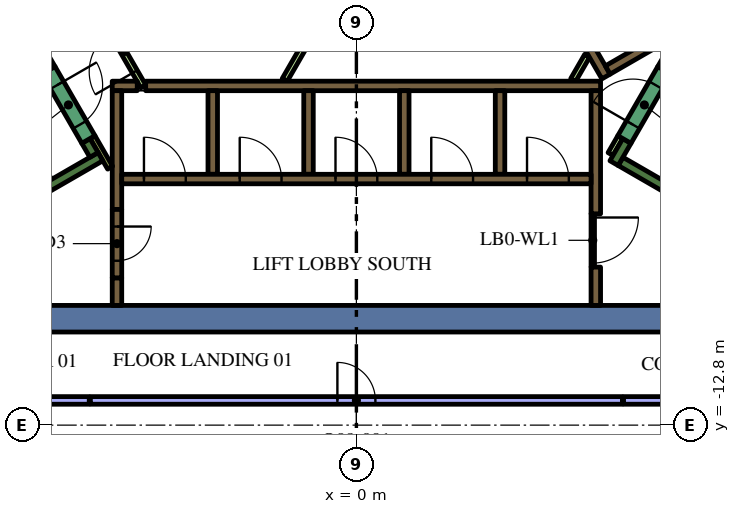
"""IFC4 building model, lengths in metres.
Left out: names, types, materials, properties, quantities, classifications, styles, units other than length and angle.
Written with IfcOpenShell. Run it as: python <this file> out.ifc"""

import sys

from ifc_helpers import new_model, si_unit, direction, frame, frame_2d, origin, place, context, subcontext, project, spatial, rectangle, extrude, element, fill, save


model = new_model("IFC4")
c1 = context("Model", 3, precision=1e-05, world=origin(), true_north=direction((0.0, 1.0)))
c2 = subcontext(c1, "Body", "Model", "MODEL_VIEW")
j1 = project(units=[si_unit("LENGTHUNIT", "METRE"), si_unit("PLANEANGLEUNIT", "RADIAN")], contexts=[c1])
p1 = place(None, origin())
s1 = spatial("IfcSite", under=j1, at=p1, CompositionType="ELEMENT")
p2 = place(p1, origin())
s2 = spatial("IfcBuilding", under=s1, at=p2, CompositionType="ELEMENT")
p3 = place(p2, frame((0.0, 0.0, 239.4)))
s3 = spatial("IfcBuildingStorey", under=s2, at=p3, CompositionType="ELEMENT", Elevation=239.4)
p4 = place(p3, frame((8.904, -10.0, 0.0), z_axis=(0.0, 0.0, 1.0), x_axis=(-1.0, 0.0, 0.0)))
e1 = element("IfcWall", 1, at=p4, inside=s3, PredefinedType="SOLIDWALL", context=c2, shape_type="SweptSolid", body=[
    extrude(rectangle(XDim=22.226, YDim=0.7, at=frame_2d((11.113, 0.0))), origin(), (0.0, 0.0, 1.0), 4.2),
])
p5 = place(p3, frame((12.84, -9.261, 0.0), z_axis=(0.0, 0.0, 1.0), x_axis=(-0.866013990052, 0.500019768644, 0.0)))
e2 = element("IfcWall", 2, at=p5, inside=s3, PredefinedType="SOLIDWALL", context=c2, shape_type="SweptSolid", body=[
    extrude(rectangle(XDim=6.8, YDim=0.25, at=frame_2d((3.4, 0.0))), origin(), (0.0, 0.0, 1.0), 4.2),
])
p6 = place(p3, frame((6.78, -5.906, 0.0), z_axis=(0.0, 0.0, 1.0), x_axis=(0.500223362819, 0.865896406789, 0.0)))
e3 = element("IfcWall", 3, at=p6, inside=s3, PredefinedType="SOLIDWALL", context=c2, shape_type="SweptSolid", body=[
    extrude(rectangle(XDim=0.675, YDim=0.25, at=frame_2d((0.337, 0.0))), origin(), (0.0, 0.0, 1.0), 4.2),
])
p7 = place(p3, frame((-12.84, -9.261, 0.0), z_axis=(0.0, 0.0, 1.0), x_axis=(0.866016039709, 0.500016218704, 0.0)))
e4 = element("IfcWall", 4, at=p7, inside=s3, PredefinedType="SOLIDWALL", context=c2, shape_type="SweptSolid", body=[
    extrude(rectangle(XDim=7.05, YDim=0.25, at=frame_2d((3.525, 0.0))), origin(), (0.0, 0.0, 1.0), 4.2),
])
p8 = place(p3, frame((-6.905, -5.69, 0.0), z_axis=(0.0, 0.0, 1.0), x_axis=(-0.500402024738, 0.865793170242, 0.0)))
e5 = element("IfcWall", 5, at=p8, inside=s3, PredefinedType="SOLIDWALL", context=c2, shape_type="SweptSolid", body=[
    extrude(rectangle(XDim=0.425, YDim=0.25, at=frame_2d((0.212, 0.0))), origin(), (0.0, 0.0, 1.0), 4.2),
])
p9 = place(p3, frame((-6.3, -8.925, 0.0), z_axis=(0.0, 0.0, 1.0), x_axis=(0.0, -1.0, 0.0)))
e6 = element("IfcWall", 6, at=p9, inside=s3, PredefinedType="SOLIDWALL", context=c2, shape_type="SweptSolid", body=[
    extrude(rectangle(XDim=0.725, YDim=0.25, at=frame_2d((0.363, 0.0))), origin(), (0.0, 0.0, 1.0), 4.2),
])
p10 = place(p3, frame((-5.545, -3.875, 0.0), z_axis=(0.0, 0.0, 1.0), x_axis=(1.0, 0.0, 0.0)))
e7 = element("IfcWall", 7, at=p10, inside=s3, PredefinedType="SOLIDWALL", context=c2, shape_type="SweptSolid", body=[
    extrude(rectangle(XDim=11.97, YDim=0.25, at=frame_2d((5.985, 0.0))), origin(), (0.0, 0.0, 1.0), 4.2),
])
p11 = place(p3, frame((-6.425, -3.875, 0.0), z_axis=(0.0, 0.0, 1.0), x_axis=(1.0, 0.0, 0.0)))
e8 = element("IfcWall", 8, at=p11, inside=s3, PredefinedType="SOLIDWALL", context=c2, shape_type="SweptSolid", body=[
    extrude(rectangle(XDim=0.658, YDim=0.25, at=frame_2d((0.329, 0.0))), origin(), (0.0, 0.0, 1.0), 4.2),
])
p12 = place(p3, frame((6.3, -7.24, 0.0), z_axis=(0.0, 0.0, 1.0), x_axis=(0.0, 1.0, 0.0)))
e9 = element("IfcWall", 9, at=p12, inside=s3, PredefinedType="SOLIDWALL", context=c2, shape_type="SweptSolid", body=[
    extrude(rectangle(XDim=3.24, YDim=0.25, at=frame_2d((1.62, 0.0))), origin(), (0.0, 0.0, 1.0), 4.2),
])
p13 = place(p3, frame((6.3, -9.65, 0.0), z_axis=(0.0, 0.0, 1.0), x_axis=(0.0, 1.0, 0.0)))
e10 = element("IfcWall", 10, at=p13, inside=s3, PredefinedType="SOLIDWALL", context=c2, shape_type="SweptSolid", body=[
    extrude(rectangle(XDim=1.008, YDim=0.25, at=frame_2d((0.504, 0.0))), origin(), (0.0, 0.0, 1.0), 4.2),
])
for number, where, z_axis, x_axis in (
    (11, (3.78, -4.0, 0.0), (0.0, 0.0, 1.0), (0.0, -1.0, 0.0)),
    (12, (1.26, -4.0, 0.0), (0.0, 0.0, 1.0), (0.0, -1.0, 0.0)),
    (13, (-1.26, -4.0, 0.0), (0.0, 0.0, 1.0), (0.0, -1.0, 0.0)),
    (14, (-3.78, -4.0, 0.0), (0.0, 0.0, 1.0), (0.0, -1.0, 0.0)),
):
    element("IfcWall", number, at=place(p3, frame(where, z_axis=z_axis, x_axis=x_axis)), inside=s3, PredefinedType="SOLIDWALL", context=c2, shape_type="SweptSolid", body=[
        extrude(rectangle(XDim=2.2, YDim=0.25, at=frame_2d((1.1, 0.0))), origin(), (0.0, 0.0, 1.0), 4.2),
    ])
p14 = place(p3, frame((-6.3, -7.125, 0.0), z_axis=(0.0, 0.0, 1.0), x_axis=(0.0, 1.0, 0.0)))
e15 = element("IfcWall", 15, at=p14, inside=s3, PredefinedType="SOLIDWALL", context=c2, shape_type="SweptSolid", body=[
    extrude(rectangle(XDim=3.125, YDim=0.25, at=frame_2d((1.562, 0.0))), origin(), (0.0, 0.0, 1.0), 4.2),
])
p15 = place(p3, frame((6.568, -3.627, 0.0), z_axis=(0.0, 0.0, 1.0), x_axis=(-0.499999455981, 0.866025717874, 0.0)))
e16 = element("IfcWall", 16, at=p15, inside=s3, PredefinedType="SOLIDWALL", context=c2, shape_type="SweptSolid", body=[
    extrude(rectangle(XDim=11.978, YDim=0.25, at=frame_2d((5.989, 0.0))), origin(), (0.0, 0.0, 1.0), 4.2),
])
p16 = place(p3, frame((6.614, -3.456, 0.0), z_axis=(0.0, 0.0, 1.0), x_axis=(0.866032512851, 0.499987686533, 0.0)))
e17 = element("IfcWall", 17, at=p16, inside=s3, PredefinedType="SOLIDWALL", context=c2, shape_type="SweptSolid", body=[
    extrude(rectangle(XDim=2.975, YDim=0.25, at=frame_2d((1.487, 0.0))), origin(), (0.0, 0.0, 1.0), 4.2),
])
p17 = place(p3, frame((-8.252, -2.958, 0.0), z_axis=(0.0, 0.0, 1.0), x_axis=(0.500174715838, -0.865924508047, 0.0)))
e18 = element("IfcWall", 18, at=p17, inside=s3, PredefinedType="PARTITIONING", context=c2, shape_type="SweptSolid", body=[
    extrude(rectangle(XDim=0.514, YDim=0.15, at=frame_2d((0.257, 0.0))), origin(), (0.0, 0.0, 1.0), 3.45),
])
p18 = place(p3, frame((-6.48, -6.027, 0.0), z_axis=(0.0, 0.0, 1.0), x_axis=(-0.499927229454, 0.866067413802, 0.0)))
e19 = element("IfcWall", 19, at=p18, inside=s3, PredefinedType="PARTITIONING", context=c2, shape_type="SweptSolid", body=[
    extrude(rectangle(XDim=0.929, YDim=0.15, at=frame_2d((0.464, 0.0))), origin(), (0.0, 0.0, 1.0), 4.2),
])
p19 = place(p3, frame((6.945, -5.222, 0.0), z_axis=(0.0, 0.0, 1.0), x_axis=(-0.499818422106, -0.866130212453, 0.0)))
e20 = element("IfcWall", 20, at=p19, inside=s3, PredefinedType="PARTITIONING", context=c2, shape_type="SweptSolid", body=[
    extrude(rectangle(XDim=0.514, YDim=0.15, at=frame_2d((0.257, 0.0))), origin(), (0.0, 0.0, 1.0), 3.45),
])
p20 = place(p3, frame((8.459, -2.599, 0.0), z_axis=(0.0, 0.0, 1.0), x_axis=(-0.500041054325, -0.866001699761, 0.0)))
e21 = element("IfcWall", 21, at=p20, inside=s3, PredefinedType="PARTITIONING", context=c2, shape_type="SweptSolid", body=[
    extrude(rectangle(XDim=0.929, YDim=0.15, at=frame_2d((0.464, 0.0))), origin(), (0.0, 0.0, 1.0), 4.2),
])
p21 = place(p3, frame((5.705, -3.718, 0.0), z_axis=(0.0, 0.0, 1.0), x_axis=(0.499962090823, 0.866047289552, 0.0)))
e22 = element("IfcWall", 22, at=p21, inside=s3, PredefinedType="PARTITIONING", context=c2, shape_type="SweptSolid", body=[
    extrude(rectangle(XDim=0.735, YDim=0.15, at=frame_2d((0.367, 0.0))), origin(), (0.0, 0.0, 1.0), 3.45),
])
p22 = place(p3, frame((-1.887, -3.718, 0.0), z_axis=(0.0, 0.0, 1.0), x_axis=(0.500043732237, 0.866000153493, 0.0)))
e23 = element("IfcWall", 23, at=p22, inside=s3, PredefinedType="PARTITIONING", context=c2, shape_type="SweptSolid", body=[
    extrude(rectangle(XDim=3.114, YDim=0.15, at=frame_2d((1.557, 0.0))), origin(), (0.0, 0.0, 1.0), 3.45),
])
p23 = place(p3, frame((-6.175, -6.325, 0.0), z_axis=(0.0, 0.0, 1.0), x_axis=(1.0, 0.0, 0.0)))
e24 = element("IfcWall", 24, at=p23, inside=s3, PredefinedType="SOLIDWALL", context=c2, shape_type="SweptSolid", body=[
    extrude(rectangle(XDim=12.35, YDim=0.25, at=frame_2d((6.175, 0.0))), origin(), (0.0, 0.0, 1.0), 4.2),
])
p24 = place(p23, frame((0.585, 0.0, 0.0)))
e25 = element("IfcOpeningElement", 25, at=p24, cuts=e24, PredefinedType="OPENING", context=c2, shape_type="SweptSolid", body=[
    extrude(rectangle(XDim=1.1, YDim=2.1, at=frame_2d((0.55, 1.05))), frame((0.0, 0.135, 0.0), z_axis=(0.0, -1.0, 0.0), x_axis=(1.0, 0.0, 0.0)), (0.0, 0.0, 1.0), 0.27),
])
p25 = place(p23, frame((3.105, 0.0, 0.0)))
e26 = element("IfcOpeningElement", 26, at=p25, cuts=e24, PredefinedType="OPENING", context=c2, shape_type="SweptSolid", body=[
    extrude(rectangle(XDim=1.1, YDim=2.1, at=frame_2d((0.55, 1.05))), frame((0.0, 0.135, 0.0), z_axis=(0.0, -1.0, 0.0), x_axis=(1.0, 0.0, 0.0)), (0.0, 0.0, 1.0), 0.27),
])
p26 = place(p23, frame((5.625, 0.0, 0.0)))
e27 = element("IfcOpeningElement", 27, at=p26, cuts=e24, PredefinedType="OPENING", context=c2, shape_type="SweptSolid", body=[
    extrude(rectangle(XDim=1.1, YDim=2.1, at=frame_2d((0.55, 1.05))), frame((0.0, 0.135, 0.0), z_axis=(0.0, -1.0, 0.0), x_axis=(1.0, 0.0, 0.0)), (0.0, 0.0, 1.0), 0.27),
])
p27 = place(p23, frame((8.145, 0.0, 0.0)))
e28 = element("IfcOpeningElement", 28, at=p27, cuts=e24, PredefinedType="OPENING", context=c2, shape_type="SweptSolid", body=[
    extrude(rectangle(XDim=1.1, YDim=2.1, at=frame_2d((0.55, 1.05))), frame((0.0, 0.135, 0.0), z_axis=(0.0, -1.0, 0.0), x_axis=(1.0, 0.0, 0.0)), (0.0, 0.0, 1.0), 0.27),
])
p28 = place(p23, frame((10.665, 0.0, 0.0)))
e29 = element("IfcOpeningElement", 29, at=p28, cuts=e24, PredefinedType="OPENING", context=c2, shape_type="SweptSolid", body=[
    extrude(rectangle(XDim=1.1, YDim=2.1, at=frame_2d((0.55, 1.05))), frame((0.0, 0.135, 0.0), z_axis=(0.0, -1.0, 0.0), x_axis=(1.0, 0.0, 0.0)), (0.0, 0.0, 1.0), 0.27),
])
p29 = place(p3, frame((7.053, -5.284, 0.0), z_axis=(0.0, 0.0, 1.0), x_axis=(0.500078061341, 0.865980330357, 0.0)))
e30 = element("IfcWall", 30, at=p29, inside=s3, PredefinedType="SOLIDWALL", context=c2, shape_type="SweptSolid", body=[
    extrude(rectangle(XDim=2.1, YDim=0.4, at=frame_2d((1.05, 0.0))), origin(), (0.0, 0.0, 1.0), 4.2),
])
p30 = place(p29, frame((0.45, 0.0, 0.0)))
e31 = element("IfcOpeningElement", 31, at=p30, cuts=e30, PredefinedType="OPENING", context=c2, shape_type="SweptSolid", body=[
    extrude(rectangle(XDim=1.2, YDim=2.1, at=frame_2d((0.6, 1.05))), frame((0.0, 0.21, 0.0), z_axis=(0.0, -1.0, 0.0), x_axis=(1.0, 0.0, 0.0)), (0.0, 0.0, 1.0), 0.42),
])
p31 = place(p3, frame((-8.103, -3.466, 0.0), z_axis=(0.0, 0.0, 1.0), x_axis=(0.500078061341, -0.865980330357, 0.0)))
e32 = element("IfcWall", 32, at=p31, inside=s3, PredefinedType="SOLIDWALL", context=c2, shape_type="SweptSolid", body=[
    extrude(rectangle(XDim=2.1, YDim=0.4, at=frame_2d((1.05, 0.0))), origin(), (0.0, 0.0, 1.0), 4.2),
])
p32 = place(p31, frame((0.45, 0.0, 0.0)))
e33 = element("IfcOpeningElement", 33, at=p32, cuts=e32, PredefinedType="OPENING", context=c2, shape_type="SweptSolid", body=[
    extrude(rectangle(XDim=1.2, YDim=2.1, at=frame_2d((0.6, 1.05))), frame((0.0, 0.21, 0.0), z_axis=(0.0, -1.0, 0.0), x_axis=(1.0, 0.0, 0.0)), (0.0, 0.0, 1.0), 0.42),
])
p33 = place(p3, frame((-6.3, -7.125, 0.0), z_axis=(0.0, 0.0, 1.0), x_axis=(0.0, -1.0, 0.0)))
e34 = element("IfcWall", 34, at=p33, inside=s3, PredefinedType="SOLIDWALL", context=c2, shape_type="SweptSolid", body=[
    extrude(rectangle(XDim=1.8, YDim=0.25, at=frame_2d((0.9, 0.0))), origin(), (0.0, 0.0, 1.0), 4.2),
])
p34 = place(p33, frame((0.45, 0.0, 0.0)))
e35 = element("IfcOpeningElement", 35, at=p34, cuts=e34, PredefinedType="OPENING", context=c2, shape_type="SweptSolid", body=[
    extrude(rectangle(XDim=0.9, YDim=2.1, at=frame_2d((0.45, 1.05))), frame((0.0, 0.135, 0.0), z_axis=(0.0, -1.0, 0.0), x_axis=(1.0, 0.0, 0.0)), (0.0, 0.0, 1.0), 0.27),
])
p35 = place(p3, frame((-5.606, -3.89, 0.0), z_axis=(0.0, 0.0, 1.0), x_axis=(-0.500027713859, 0.866009402589, 0.0)))
e36 = element("IfcWall", 36, at=p35, inside=s3, PredefinedType="PARTITIONING", context=c2, shape_type="SweptSolid", body=[
    extrude(rectangle(XDim=2.1, YDim=0.15, at=frame_2d((1.05, 0.0))), origin(), (0.0, 0.0, 1.0), 3.45),
])
p36 = place(p35, frame((0.45, 0.0, 0.0)))
e37 = element("IfcOpeningElement", 37, at=p36, cuts=e36, PredefinedType="OPENING", context=c2, shape_type="SweptSolid", body=[
    extrude(rectangle(XDim=1.2, YDim=2.1, at=frame_2d((0.6, 1.05))), frame((0.0, 0.085, 0.0), z_axis=(0.0, -1.0, 0.0), x_axis=(1.0, 0.0, 0.0)), (0.0, 0.0, 1.0), 0.17),
])
p37 = place(p3, frame((6.22, -7.237, 0.0), z_axis=(0.0, 0.0, 1.0), x_axis=(0.0, -1.0, 0.0)))
e38 = element("IfcWall", 38, at=p37, inside=s3, PredefinedType="PARTITIONING", context=c2, shape_type="SweptSolid", body=[
    extrude(rectangle(XDim=1.4, YDim=0.09, at=frame_2d((0.7, 0.0))), origin(), (0.0, 0.0, 1.0), 3.45),
])
p38 = place(p37, frame((0.1, 0.0, 0.0)))
e39 = element("IfcOpeningElement", 39, at=p38, cuts=e38, PredefinedType="OPENING", context=c2, shape_type="SweptSolid", body=[
    extrude(rectangle(XDim=1.2, YDim=2.1, at=frame_2d((0.6, 1.05))), frame((0.0, 0.055, 0.0), z_axis=(0.0, -1.0, 0.0), x_axis=(1.0, 0.0, 0.0)), (0.0, 0.0, 1.0), 0.11),
])
p39 = place(p3, frame((-7.0, -12.15, 0.0), z_axis=(0.0, 0.0, 1.0), x_axis=(1.0, 0.0, 0.0)))
e40 = element("IfcWall", 40, at=p39, inside=s3, PredefinedType="PARTITIONING", context=c2, shape_type="SweptSolid", body=[
    extrude(rectangle(XDim=14.0, YDim=0.2, at=frame_2d((7.0, 0.0))), origin(), (0.0, 0.0, 1.0), 3.45),
])
p40 = place(p39, frame((6.5, 0.0, 0.0)))
e41 = element("IfcOpeningElement", 41, at=p40, cuts=e40, PredefinedType="OPENING", context=c2, shape_type="SweptSolid", body=[
    extrude(rectangle(XDim=1.0, YDim=2.1, at=frame_2d((0.5, 1.05))), frame((0.0, 0.11, 0.0), z_axis=(0.0, -1.0, 0.0), x_axis=(1.0, 0.0, 0.0)), (0.0, 0.0, 1.0), 0.22),
])
for number, where, z_axis, x_axis in (
    (42, (-9.52, -12.15, 0.0), (0.0, 0.0, 1.0), (1.0, 0.0, 0.0)),
    (43, (7.03, -12.15, 0.0), (0.0, 0.0, 1.0), (1.0, 0.0, 0.0)),
):
    element("IfcWall", number, at=place(p3, frame(where, z_axis=z_axis, x_axis=x_axis)), inside=s3, PredefinedType="PARTITIONING", context=c2, shape_type="SweptSolid", body=[
        extrude(rectangle(XDim=2.49, YDim=0.2, at=frame_2d((1.245, 0.0))), origin(), (0.0, 0.0, 1.0), 3.45),
    ])
p41 = place(p24, origin())
e44 = element("IfcDoor", 44, at=p41, inside=s3, OperationType="DOUBLE_DOOR_SLIDING", PredefinedType="DOOR", context=c2, shape_type="SweptSolid", body=[
    extrude(rectangle(XDim=1.1, YDim=2.1, at=frame_2d((0.55, 1.05))), frame((0.0, 0.025, 0.0), z_axis=(0.0, -1.0, 0.0), x_axis=(1.0, 0.0, 0.0)), (0.0, 0.0, 1.0), 0.05),
])
fill(e25, e44)
p42 = place(p25, origin())
e45 = element("IfcDoor", 45, at=p42, inside=s3, OperationType="DOUBLE_DOOR_SLIDING", PredefinedType="DOOR", context=c2, shape_type="SweptSolid", body=[
    extrude(rectangle(XDim=1.1, YDim=2.1, at=frame_2d((0.55, 1.05))), frame((0.0, 0.025, 0.0), z_axis=(0.0, -1.0, 0.0), x_axis=(1.0, 0.0, 0.0)), (0.0, 0.0, 1.0), 0.05),
])
fill(e26, e45)
p43 = place(p26, origin())
e46 = element("IfcDoor", 46, at=p43, inside=s3, OperationType="DOUBLE_DOOR_SLIDING", PredefinedType="DOOR", context=c2, shape_type="SweptSolid", body=[
    extrude(rectangle(XDim=1.1, YDim=2.1, at=frame_2d((0.55, 1.05))), frame((0.0, 0.025, 0.0), z_axis=(0.0, -1.0, 0.0), x_axis=(1.0, 0.0, 0.0)), (0.0, 0.0, 1.0), 0.05),
])
fill(e27, e46)
p44 = place(p27, origin())
e47 = element("IfcDoor", 47, at=p44, inside=s3, OperationType="DOUBLE_DOOR_SLIDING", PredefinedType="DOOR", context=c2, shape_type="SweptSolid", body=[
    extrude(rectangle(XDim=1.1, YDim=2.1, at=frame_2d((0.55, 1.05))), frame((0.0, 0.025, 0.0), z_axis=(0.0, -1.0, 0.0), x_axis=(1.0, 0.0, 0.0)), (0.0, 0.0, 1.0), 0.05),
])
fill(e28, e47)
p45 = place(p28, origin())
e48 = element("IfcDoor", 48, at=p45, inside=s3, OperationType="DOUBLE_DOOR_SLIDING", PredefinedType="DOOR", context=c2, shape_type="SweptSolid", body=[
    extrude(rectangle(XDim=1.1, YDim=2.1, at=frame_2d((0.55, 1.05))), frame((0.0, 0.025, 0.0), z_axis=(0.0, -1.0, 0.0), x_axis=(1.0, 0.0, 0.0)), (0.0, 0.0, 1.0), 0.05),
])
fill(e29, e48)
p46 = place(p30, origin())
e49 = element("IfcDoor", 49, at=p46, inside=s3, OperationType="SINGLE_SWING_LEFT", PredefinedType="DOOR", context=c2, shape_type="SweptSolid", body=[
    extrude(rectangle(XDim=1.2, YDim=2.1, at=frame_2d((0.6, 1.05))), frame((0.0, 0.025, 0.0), z_axis=(0.0, -1.0, 0.0), x_axis=(1.0, 0.0, 0.0)), (0.0, 0.0, 1.0), 0.05),
])
fill(e31, e49)
p47 = place(p32, origin())
e50 = element("IfcDoor", 50, at=p47, inside=s3, OperationType="SINGLE_SWING_LEFT", PredefinedType="DOOR", context=c2, shape_type="SweptSolid", body=[
    extrude(rectangle(XDim=1.2, YDim=2.1, at=frame_2d((0.6, 1.05))), frame((0.0, 0.025, 0.0), z_axis=(0.0, -1.0, 0.0), x_axis=(1.0, 0.0, 0.0)), (0.0, 0.0, 1.0), 0.05),
])
fill(e33, e50)
p48 = place(p34, origin())
e51 = element("IfcDoor", 51, at=p48, inside=s3, OperationType="SINGLE_SWING_LEFT", PredefinedType="DOOR", context=c2, shape_type="SweptSolid", body=[
    extrude(rectangle(XDim=0.9, YDim=2.1, at=frame_2d((0.45, 1.05))), frame((0.0, 0.025, 0.0), z_axis=(0.0, -1.0, 0.0), x_axis=(1.0, 0.0, 0.0)), (0.0, 0.0, 1.0), 0.05),
])
fill(e35, e51)
p49 = place(p36, origin())
e52 = element("IfcDoor", 52, at=p49, inside=s3, OperationType="SINGLE_SWING_LEFT", PredefinedType="DOOR", context=c2, shape_type="SweptSolid", body=[
    extrude(rectangle(XDim=1.2, YDim=2.1, at=frame_2d((0.6, 1.05))), frame((0.0, 0.025, 0.0), z_axis=(0.0, -1.0, 0.0), x_axis=(1.0, 0.0, 0.0)), (0.0, 0.0, 1.0), 0.05),
])
fill(e37, e52)
p50 = place(p38, origin())
e53 = element("IfcDoor", 53, at=p50, inside=s3, OperationType="SINGLE_SWING_LEFT", PredefinedType="DOOR", context=c2, shape_type="SweptSolid", body=[
    extrude(rectangle(XDim=1.2, YDim=2.1, at=frame_2d((0.6, 1.05))), frame((0.0, 0.025, 0.0), z_axis=(0.0, -1.0, 0.0), x_axis=(1.0, 0.0, 0.0)), (0.0, 0.0, 1.0), 0.05),
])
fill(e39, e53)
p51 = place(p40, origin())
e54 = element("IfcDoor", 54, at=p51, inside=s3, OperationType="SINGLE_SWING_RIGHT", PredefinedType="DOOR", context=c2, shape_type="SweptSolid", body=[
    extrude(rectangle(XDim=1.0, YDim=2.1, at=frame_2d((0.5, 1.05))), frame((0.0, 0.025, 0.0), z_axis=(0.0, -1.0, 0.0), x_axis=(1.0, 0.0, 0.0)), (0.0, 0.0, 1.0), 0.05),
])
fill(e41, e54)
save(model, sys.argv[1])
